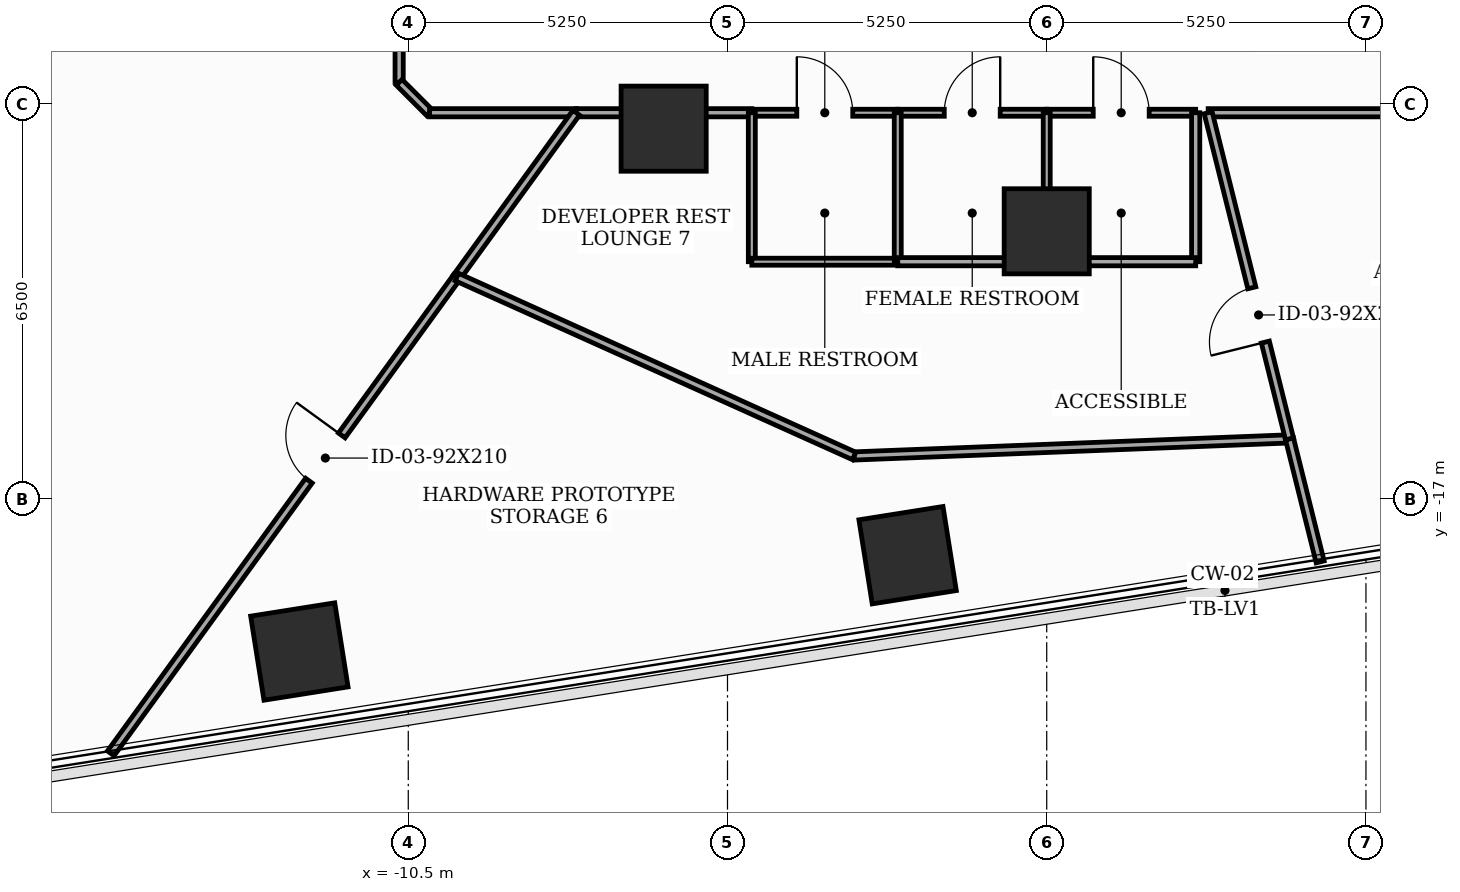
"""IFC4 building model, lengths in metres.
Left out: names, types, materials, properties, quantities, classifications, styles, units other than length and angle.
Written with IfcOpenShell. Run it as: python <this file> out.ifc"""

import sys

from ifc_helpers import new_model, si_unit, direction, frame, frame_2d, origin, origin_2d, place, context, subcontext, project, spatial, rectangle, extrude, element, fill, save


model = new_model("IFC4")
c1 = context("Model", 3, precision=1e-05, world=origin(), true_north=direction((0.0, 1.0)))
c2 = subcontext(c1, "Body", "Model", "MODEL_VIEW")
j1 = project(units=[si_unit("LENGTHUNIT", "METRE"), si_unit("PLANEANGLEUNIT", "RADIAN")], contexts=[c1])
p1 = place(None, origin())
s1 = spatial("IfcSite", under=j1, at=p1, CompositionType="ELEMENT")
p2 = place(p1, origin())
s2 = spatial("IfcBuilding", under=s1, at=p2, CompositionType="ELEMENT")
p3 = place(p2, frame((0.0, 0.0, 63.0)))
s3 = spatial("IfcBuildingStorey", under=s2, at=p3, CompositionType="ELEMENT", Elevation=63.0)
for number, where, z_axis, x_axis in (
    (1, (-6.3, -10.912, 0.0), (0.0, 0.0, 1.0), (1.0, 0.0, 0.0)),
    (2, (0.0, -12.6, 0.0), (0.0, 0.0, 1.0), (1.0, 0.0, 0.0)),
    (3, (-12.291, -19.511, 0.0), (0.0, 0.0, 1.0), (0.988, 0.156, 0.0)),
    (4, (-2.288, -17.927, 0.0), (0.0, 0.0, 1.0), (0.988, 0.156, 0.0)),
):
    element("IfcColumn", number, at=place(p3, frame(where, z_axis=z_axis, x_axis=x_axis)), inside=s3, PredefinedType="COLUMN", context=c2, shape_type="SweptSolid", body=[
        extrude(rectangle(XDim=1.4, YDim=1.4, at=origin_2d()), origin(), (0.0, 0.0, 1.0), 3.7),
    ])
p4 = place(p3, frame((-10.65, -3.992, 0.0), z_axis=(0.0, 0.0, 1.0), x_axis=(0.0, -1.0, 0.0)))
e5 = element("IfcWall", 5, at=p4, inside=s3, PredefinedType="PARTITIONING", context=c2, shape_type="SweptSolid", body=[
    extrude(rectangle(XDim=6.158, YDim=0.135, at=frame_2d((3.079, 0.0))), origin(), (0.0, 0.0, 1.0), 2.785),
])
p5 = place(p3, frame((-10.65, -10.15, 0.0), z_axis=(0.0, 0.0, 1.0), x_axis=(0.707106781187, -0.707106781187, 0.0)))
e6 = element("IfcWall", 6, at=p5, inside=s3, PredefinedType="PARTITIONING", context=c2, shape_type="SweptSolid", body=[
    extrude(rectangle(XDim=0.707, YDim=0.135, at=frame_2d((0.354, 0.0))), origin(), (0.0, 0.0, 1.0), 3.5),
])
p6 = place(p3, frame((-10.15, -10.65, 0.0), z_axis=(0.0, 0.0, 1.0), x_axis=(1.0, 0.0, 0.0)))
e7 = element("IfcWall", 7, at=p6, inside=s3, PredefinedType="PARTITIONING", context=c2, shape_type="SweptSolid", body=[
    extrude(rectangle(XDim=2.412, YDim=0.135, at=frame_2d((1.206, 0.0))), origin(), (0.0, 0.0, 1.0), 3.5),
])
p7 = place(p3, frame((-4.85, -10.65, 0.0), z_axis=(0.0, 0.0, 1.0), x_axis=(1.0, 0.0, 0.0)))
e8 = element("IfcWall", 8, at=p7, inside=s3, PredefinedType="PARTITIONING", context=c2, shape_type="SweptSolid", body=[
    extrude(rectangle(XDim=2.4, YDim=0.115, at=frame_2d((1.2, 0.0))), origin(), (0.0, 0.0, 1.0), 3.5),
])
p8 = place(p7, frame((0.74, 0.0, 0.0)))
e9 = element("IfcOpeningElement", 9, at=p8, cuts=e8, PredefinedType="OPENING", context=c2, shape_type="SweptSolid", body=[
    extrude(rectangle(XDim=0.92, YDim=2.1, at=frame_2d((0.46, 1.05))), frame((0.0, 0.067, 0.0), z_axis=(0.0, -1.0, 0.0), x_axis=(1.0, 0.0, 0.0)), (0.0, 0.0, 1.0), 0.135),
])
p9 = place(p3, frame((-7.738, -10.65, 0.0), z_axis=(0.0, 0.0, 1.0), x_axis=(1.0, 0.0, 0.0)))
e10 = element("IfcWall", 10, at=p9, inside=s3, PredefinedType="PARTITIONING", context=c2, shape_type="SweptSolid", body=[
    extrude(rectangle(XDim=2.888, YDim=0.135, at=frame_2d((1.444, 0.0))), origin(), (0.0, 0.0, 1.0), 2.785),
])
p10 = place(p3, frame((-2.45, -10.65, 0.0), z_axis=(0.0, 0.0, 1.0), x_axis=(1.0, 0.0, 0.0)))
e11 = element("IfcWall", 11, at=p10, inside=s3, PredefinedType="PARTITIONING", context=c2, shape_type="SweptSolid", body=[
    extrude(rectangle(XDim=2.45, YDim=0.115, at=frame_2d((1.225, 0.0))), origin(), (0.0, 0.0, 1.0), 2.785),
])
p11 = place(p10, frame((0.765, 0.0, 0.0)))
e12 = element("IfcOpeningElement", 12, at=p11, cuts=e11, PredefinedType="OPENING", context=c2, shape_type="SweptSolid", body=[
    extrude(rectangle(XDim=0.92, YDim=2.1, at=frame_2d((0.46, 1.05))), frame((0.0, 0.067, 0.0), z_axis=(0.0, -1.0, 0.0), x_axis=(1.0, 0.0, 0.0)), (0.0, 0.0, 1.0), 0.135),
])
p12 = place(p3, frame((0.0, -10.65, 0.0), z_axis=(0.0, 0.0, 1.0), x_axis=(1.0, 0.0, 0.0)))
e13 = element("IfcWall", 13, at=p12, inside=s3, PredefinedType="PARTITIONING", context=c2, shape_type="SweptSolid", body=[
    extrude(rectangle(XDim=2.45, YDim=0.115, at=frame_2d((1.225, 0.0))), origin(), (0.0, 0.0, 1.0), 3.5),
])
p13 = place(p12, frame((0.765, 0.0, 0.0)))
e14 = element("IfcOpeningElement", 14, at=p13, cuts=e13, PredefinedType="OPENING", context=c2, shape_type="SweptSolid", body=[
    extrude(rectangle(XDim=0.92, YDim=2.1, at=frame_2d((0.46, 1.05))), frame((0.0, 0.067, 0.0), z_axis=(0.0, -1.0, 0.0), x_axis=(1.0, 0.0, 0.0)), (0.0, 0.0, 1.0), 0.135),
])
p14 = place(p3, frame((2.655, -10.65, 0.0), z_axis=(0.0, 0.0, 1.0), x_axis=(1.0, 0.0, 0.0)))
e15 = element("IfcWall", 15, at=p14, inside=s3, PredefinedType="PARTITIONING", context=c2, shape_type="SweptSolid", body=[
    extrude(rectangle(XDim=7.495, YDim=0.135, at=frame_2d((3.748, 0.0))), origin(), (0.0, 0.0, 1.0), 2.785),
])
p15 = place(p3, frame((-15.393, -21.187, 0.0), z_axis=(0.0, 0.0, 1.0), x_axis=(0.587736917223, 0.809052109653, 0.0)))
e16 = element("IfcWall", 16, at=p15, inside=s3, PredefinedType="PARTITIONING", context=c2, shape_type="SweptSolid", body=[
    extrude(rectangle(XDim=9.684, YDim=0.135, at=frame_2d((4.842, 0.0))), origin(), (0.0, 0.0, 1.0), 2.935),
])
p16 = place(p15, frame((5.544, 0.0, 0.0)))
e17 = element("IfcOpeningElement", 17, at=p16, cuts=e16, PredefinedType="OPENING", context=c2, shape_type="SweptSolid", body=[
    extrude(rectangle(XDim=0.92, YDim=2.1, at=frame_2d((0.46, 1.05))), frame((0.0, 0.077, 0.0), z_axis=(0.0, -1.0, 0.0), x_axis=(1.0, 0.0, 0.0)), (0.0, 0.0, 1.0), 0.155),
])
p17 = place(p3, frame((-9.701, -13.352, 0.0), z_axis=(0.0, 0.0, 1.0), x_axis=(0.587719574609, 0.809064707932, 0.0)))
e18 = element("IfcWall", 18, at=p17, inside=s3, PredefinedType="PARTITIONING", context=c2, shape_type="SweptSolid", body=[
    extrude(rectangle(XDim=3.34, YDim=0.135, at=frame_2d((1.67, 0.0))), origin(), (0.0, 0.0, 1.0), 3.5),
])
p18 = place(p3, frame((3.993, -16.014, 0.0), z_axis=(0.0, 0.0, 1.0), x_axis=(-0.999230720769, -0.039216918185, 0.0)))
e19 = element("IfcWall", 19, at=p18, inside=s3, PredefinedType="PARTITIONING", context=c2, shape_type="SweptSolid", body=[
    extrude(rectangle(XDim=7.166, YDim=0.135, at=frame_2d((3.583, 0.0))), origin(), (0.0, 0.0, 1.0), 2.785),
])
p19 = place(p3, frame((-3.167, -16.295, 0.0), z_axis=(0.0, 0.0, 1.0), x_axis=(-0.911785675506, 0.410666387645, 0.0)))
e20 = element("IfcWall", 20, at=p19, inside=s3, PredefinedType="PARTITIONING", context=c2, shape_type="SweptSolid", body=[
    extrude(rectangle(XDim=7.166, YDim=0.135, at=frame_2d((3.583, 0.0))), origin(), (0.0, 0.0, 1.0), 2.785),
])
p20 = place(p3, frame((4.497, -18.037, 0.0), z_axis=(0.0, 0.0, 1.0), x_axis=(-0.24157117672, 0.970383102995, 0.0)))
e21 = element("IfcWall", 21, at=p20, inside=s3, PredefinedType="PARTITIONING", context=c2, shape_type="SweptSolid", body=[
    extrude(rectangle(XDim=2.085, YDim=0.135, at=frame_2d((1.042, 0.0))), origin(), (0.0, 0.0, 1.0), 2.935),
])
p21 = place(p3, frame((-4.85, -10.65, 0.0), z_axis=(0.0, 0.0, 1.0), x_axis=(0.0, -1.0, 0.0)))
e22 = element("IfcWall", 22, at=p21, inside=s3, PredefinedType="PARTITIONING", context=c2, shape_type="SweptSolid", body=[
    extrude(rectangle(XDim=2.45, YDim=0.115, at=frame_2d((1.225, 0.0))), origin(), (0.0, 0.0, 1.0), 2.785),
])
p22 = place(p3, frame((-4.85, -13.1, 0.0), z_axis=(0.0, 0.0, 1.0), x_axis=(1.0, 0.0, 0.0)))
e23 = element("IfcWall", 23, at=p22, inside=s3, PredefinedType="PARTITIONING", context=c2, shape_type="SweptSolid", body=[
    extrude(rectangle(XDim=2.4, YDim=0.115, at=frame_2d((1.2, 0.0))), origin(), (0.0, 0.0, 1.0), 3.5),
])
p23 = place(p3, frame((-2.45, -13.1, 0.0), z_axis=(0.0, 0.0, 1.0), x_axis=(0.0, 1.0, 0.0)))
e24 = element("IfcWall", 24, at=p23, inside=s3, PredefinedType="PARTITIONING", context=c2, shape_type="SweptSolid", body=[
    extrude(rectangle(XDim=2.45, YDim=0.115, at=frame_2d((1.225, 0.0))), origin(), (0.0, 0.0, 1.0), 2.785),
])
p24 = place(p3, frame((0.0, -13.1, 0.0), z_axis=(0.0, 0.0, 1.0), x_axis=(-1.0, 0.0, 0.0)))
e25 = element("IfcWall", 25, at=p24, inside=s3, PredefinedType="PARTITIONING", context=c2, shape_type="SweptSolid", body=[
    extrude(rectangle(XDim=2.45, YDim=0.135, at=frame_2d((1.225, 0.0))), origin(), (0.0, 0.0, 1.0), 2.785),
])
p25 = place(p3, frame((2.45, -10.65, 0.0), z_axis=(0.0, 0.0, 1.0), x_axis=(0.0, -1.0, 0.0)))
e26 = element("IfcWall", 26, at=p25, inside=s3, PredefinedType="PARTITIONING", context=c2, shape_type="SweptSolid", body=[
    extrude(rectangle(XDim=2.45, YDim=0.135, at=frame_2d((1.225, 0.0))), origin(), (0.0, 0.0, 1.0), 2.785),
])
p26 = place(p3, frame((2.45, -13.1, 0.0), z_axis=(0.0, 0.0, 1.0), x_axis=(-1.0, 0.0, 0.0)))
e27 = element("IfcWall", 27, at=p26, inside=s3, PredefinedType="PARTITIONING", context=c2, shape_type="SweptSolid", body=[
    extrude(rectangle(XDim=2.45, YDim=0.135, at=frame_2d((1.225, 0.0))), origin(), (0.0, 0.0, 1.0), 2.785),
])
p27 = place(p3, frame((3.993, -16.014, 0.0), z_axis=(0.0, 0.0, 1.0), x_axis=(-0.242005649473, 0.97027484025, 0.0)))
e28 = element("IfcWall", 28, at=p27, inside=s3, PredefinedType="PARTITIONING", context=c2, shape_type="SweptSolid", body=[
    extrude(rectangle(XDim=5.528, YDim=0.135, at=frame_2d((2.764, 0.0))), origin(), (0.0, 0.0, 1.0), 2.785),
])
p28 = place(p27, frame((1.641, 0.0, 0.0)))
e29 = element("IfcOpeningElement", 29, at=p28, cuts=e28, PredefinedType="OPENING", context=c2, shape_type="SweptSolid", body=[
    extrude(rectangle(XDim=0.92, YDim=2.1, at=frame_2d((0.46, 1.05))), frame((0.0, 0.077, 0.0), z_axis=(0.0, -1.0, 0.0), x_axis=(1.0, 0.0, 0.0)), (0.0, 0.0, 1.0), 0.155),
])
p29 = place(p3, frame((0.0, -13.1, 0.0), z_axis=(0.0, 0.0, 1.0), x_axis=(0.0, 1.0, 0.0)))
e30 = element("IfcWall", 30, at=p29, inside=s3, PredefinedType="PARTITIONING", context=c2, shape_type="SweptSolid", body=[
    extrude(rectangle(XDim=2.45, YDim=0.115, at=frame_2d((1.225, 0.0))), origin(), (0.0, 0.0, 1.0), 2.785),
])
p30 = place(p8, origin())
e31 = element("IfcDoor", 31, at=p30, inside=s3, OperationType="SINGLE_SWING_LEFT", PredefinedType="DOOR", context=c2, shape_type="SweptSolid", body=[
    extrude(rectangle(XDim=0.92, YDim=2.1, at=frame_2d((0.46, 1.05))), frame((0.0, 0.025, 0.0), z_axis=(0.0, -1.0, 0.0), x_axis=(1.0, 0.0, 0.0)), (0.0, 0.0, 1.0), 0.05),
])
fill(e9, e31)
p31 = place(p11, origin())
e32 = element("IfcDoor", 32, at=p31, inside=s3, OperationType="SINGLE_SWING_RIGHT", PredefinedType="DOOR", context=c2, shape_type="SweptSolid", body=[
    extrude(rectangle(XDim=0.92, YDim=2.1, at=frame_2d((0.46, 1.05))), frame((0.0, 0.025, 0.0), z_axis=(0.0, -1.0, 0.0), x_axis=(1.0, 0.0, 0.0)), (0.0, 0.0, 1.0), 0.05),
])
fill(e12, e32)
p32 = place(p13, origin())
e33 = element("IfcDoor", 33, at=p32, inside=s3, OperationType="SINGLE_SWING_LEFT", PredefinedType="DOOR", context=c2, shape_type="SweptSolid", body=[
    extrude(rectangle(XDim=0.92, YDim=2.1, at=frame_2d((0.46, 1.05))), frame((0.0, 0.025, 0.0), z_axis=(0.0, -1.0, 0.0), x_axis=(1.0, 0.0, 0.0)), (0.0, 0.0, 1.0), 0.05),
])
fill(e14, e33)
p33 = place(p16, origin())
e34 = element("IfcDoor", 34, at=p33, inside=s3, OperationType="SINGLE_SWING_RIGHT", PredefinedType="DOOR", context=c2, shape_type="SweptSolid", body=[
    extrude(rectangle(XDim=0.92, YDim=2.1, at=frame_2d((0.46, 1.05))), frame((0.0, 0.025, 0.0), z_axis=(0.0, -1.0, 0.0), x_axis=(1.0, 0.0, 0.0)), (0.0, 0.0, 1.0), 0.05),
])
fill(e17, e34)
p34 = place(p28, origin())
e35 = element("IfcDoor", 35, at=p34, inside=s3, OperationType="SINGLE_SWING_LEFT", PredefinedType="DOOR", context=c2, shape_type="SweptSolid", body=[
    extrude(rectangle(XDim=0.92, YDim=2.1, at=frame_2d((0.46, 1.05))), frame((0.0, 0.025, 0.0), z_axis=(0.0, -1.0, 0.0), x_axis=(1.0, 0.0, 0.0)), (0.0, 0.0, 1.0), 0.05),
])
fill(e29, e35)
save(model, sys.argv[1])
